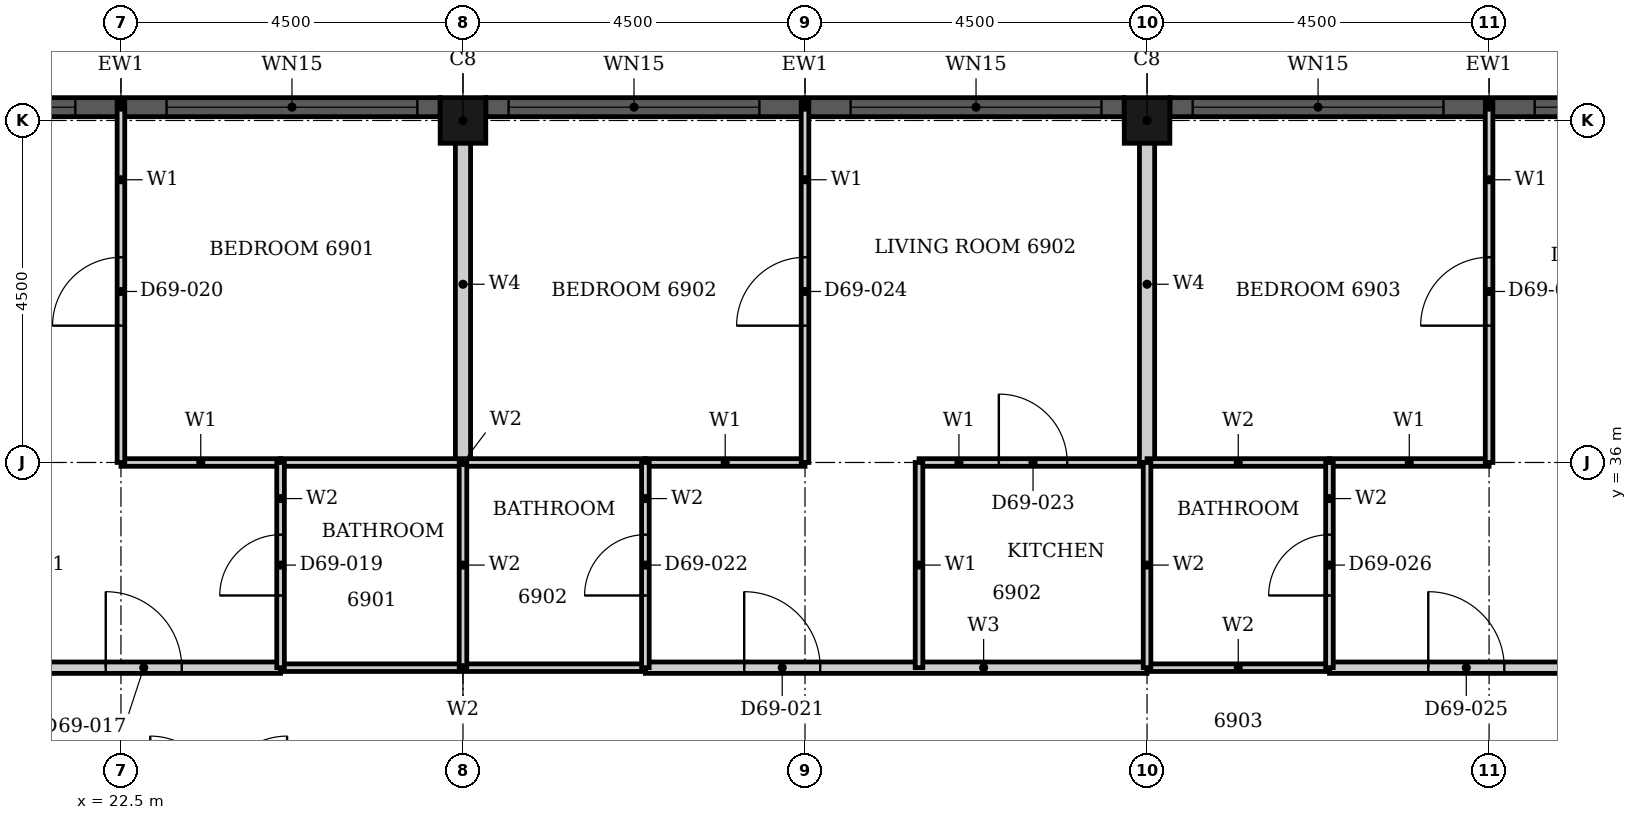
"""IFC4 building model, lengths in metres.
Left out: names, types, materials, properties, quantities, classifications, styles, units other than length and angle.
Written with IfcOpenShell. Run it as: python <this file> out.ifc"""

import sys

from ifc_helpers import new_model, si_unit, direction, frame, frame_2d, origin, origin_2d, place, context, subcontext, project, spatial, rectangle, hollow_rectangle, extrude, element, fill, save


model = new_model("IFC4")
c1 = context("Model", 3, precision=1e-05, world=origin(), true_north=direction((0.0, 1.0)))
c2 = subcontext(c1, "Body", "Model", "MODEL_VIEW")
j1 = project(units=[si_unit("LENGTHUNIT", "METRE"), si_unit("PLANEANGLEUNIT", "RADIAN")], contexts=[c1])
p1 = place(None, origin())
s1 = spatial("IfcSite", under=j1, at=p1, CompositionType="ELEMENT")
p2 = place(p1, origin())
s2 = spatial("IfcBuilding", under=s1, at=p2, CompositionType="ELEMENT")
p3 = place(p2, frame((0.0, 0.0, 271.2)))
s3 = spatial("IfcBuildingStorey", under=s2, at=p3, CompositionType="ELEMENT", Elevation=271.2)
for number, where, z_axis, x_axis in (
    (1, (36.0, 40.5, 0.0), (0.0, 0.0, 1.0), (1.0, 0.0, 0.0)),
    (2, (27.0, 40.5, 0.0), (0.0, 0.0, 1.0), (1.0, 0.0, 0.0)),
):
    element("IfcColumn", number, at=place(p3, frame(where, z_axis=z_axis, x_axis=x_axis)), inside=s3, PredefinedType="COLUMN", context=c2, shape_type="SweptSolid", body=[
        extrude(hollow_rectangle(XDim=0.6, YDim=0.6, WallThickness=0.02, at=origin_2d()), origin(), (0.0, 0.0, 1.0), 3.7),
    ])
p4 = place(p3, frame((44.7, 40.675, 0.0), z_axis=(0.0, 0.0, 1.0), x_axis=(-1.0, 0.0, 0.0)))
e3 = element("IfcWall", 3, at=p4, inside=s3, PredefinedType="SOLIDWALL", context=c2, shape_type="SweptSolid", body=[
    extrude(rectangle(XDim=8.4, YDim=0.25, at=frame_2d((4.2, 0.0))), origin(), (0.0, 0.0, 1.0), 3.7),
])
p5 = place(p4, frame((0.3, 0.0, 0.45)))
e4 = element("IfcOpeningElement", 4, at=p5, cuts=e3, PredefinedType="OPENING", context=c2, shape_type="SweptSolid", body=[
    extrude(rectangle(XDim=3.3, YDim=2.3, at=frame_2d((1.65, 1.15))), frame((0.0, 0.135, 0.0), z_axis=(0.0, -1.0, 0.0), x_axis=(1.0, 0.0, 0.0)), (0.0, 0.0, 1.0), 0.27),
])
p6 = place(p4, frame((4.8, 0.0, 0.45)))
e5 = element("IfcOpeningElement", 5, at=p6, cuts=e3, PredefinedType="OPENING", context=c2, shape_type="SweptSolid", body=[
    extrude(rectangle(XDim=3.3, YDim=2.3, at=frame_2d((1.65, 1.15))), frame((0.0, 0.135, 0.0), z_axis=(0.0, -1.0, 0.0), x_axis=(1.0, 0.0, 0.0)), (0.0, 0.0, 1.0), 0.27),
])
p7 = place(p3, frame((35.7, 40.675, 0.0), z_axis=(0.0, 0.0, 1.0), x_axis=(-1.0, 0.0, 0.0)))
e6 = element("IfcWall", 6, at=p7, inside=s3, PredefinedType="SOLIDWALL", context=c2, shape_type="SweptSolid", body=[
    extrude(rectangle(XDim=8.4, YDim=0.25, at=frame_2d((4.2, 0.0))), origin(), (0.0, 0.0, 1.0), 3.7),
])
p8 = place(p7, frame((0.3, 0.0, 0.45)))
e7 = element("IfcOpeningElement", 7, at=p8, cuts=e6, PredefinedType="OPENING", context=c2, shape_type="SweptSolid", body=[
    extrude(rectangle(XDim=3.3, YDim=2.3, at=frame_2d((1.65, 1.15))), frame((0.0, 0.135, 0.0), z_axis=(0.0, -1.0, 0.0), x_axis=(1.0, 0.0, 0.0)), (0.0, 0.0, 1.0), 0.27),
])
p9 = place(p7, frame((4.8, 0.0, 0.45)))
e8 = element("IfcOpeningElement", 8, at=p9, cuts=e6, PredefinedType="OPENING", context=c2, shape_type="SweptSolid", body=[
    extrude(rectangle(XDim=3.3, YDim=2.3, at=frame_2d((1.65, 1.15))), frame((0.0, 0.135, 0.0), z_axis=(0.0, -1.0, 0.0), x_axis=(1.0, 0.0, 0.0)), (0.0, 0.0, 1.0), 0.27),
])
p10 = place(p3, frame((26.7, 40.675, 0.0), z_axis=(0.0, 0.0, 1.0), x_axis=(-1.0, 0.0, 0.0)))
e9 = element("IfcWall", 9, at=p10, inside=s3, PredefinedType="SOLIDWALL", context=c2, shape_type="SweptSolid", body=[
    extrude(rectangle(XDim=8.4, YDim=0.25, at=frame_2d((4.2, 0.0))), origin(), (0.0, 0.0, 1.0), 3.7),
])
p11 = place(p10, frame((0.3, 0.0, 0.45)))
e10 = element("IfcOpeningElement", 10, at=p11, cuts=e9, PredefinedType="OPENING", context=c2, shape_type="SweptSolid", body=[
    extrude(rectangle(XDim=3.3, YDim=2.3, at=frame_2d((1.65, 1.15))), frame((0.0, 0.135, 0.0), z_axis=(0.0, -1.0, 0.0), x_axis=(1.0, 0.0, 0.0)), (0.0, 0.0, 1.0), 0.27),
])
p12 = place(p10, frame((4.8, 0.0, 0.45)))
e11 = element("IfcOpeningElement", 11, at=p12, cuts=e9, PredefinedType="OPENING", context=c2, shape_type="SweptSolid", body=[
    extrude(rectangle(XDim=3.3, YDim=2.3, at=frame_2d((1.65, 1.15))), frame((0.0, 0.135, 0.0), z_axis=(0.0, -1.0, 0.0), x_axis=(1.0, 0.0, 0.0)), (0.0, 0.0, 1.0), 0.27),
])
p13 = place(p3, frame((18.0, 33.3, 0.0), z_axis=(0.0, 0.0, 1.0), x_axis=(1.0, 0.0, 0.0)))
e12 = element("IfcWall", 12, at=p13, inside=s3, PredefinedType="PARTITIONING", context=c2, shape_type="SweptSolid", body=[
    extrude(rectangle(XDim=6.6, YDim=0.15, at=frame_2d((3.3, 0.0))), origin(), (0.0, 0.0, 1.0), 3.4),
])
p14 = place(p13, frame((4.3, 0.0, 0.0)))
e13 = element("IfcOpeningElement", 13, at=p14, cuts=e12, PredefinedType="OPENING", context=c2, shape_type="SweptSolid", body=[
    extrude(rectangle(XDim=1.0, YDim=2.2, at=frame_2d((0.5, 1.1))), frame((0.0, 0.085, 0.0), z_axis=(0.0, -1.0, 0.0), x_axis=(1.0, 0.0, 0.0)), (0.0, 0.0, 1.0), 0.17),
])
p15 = place(p3, frame((29.4, 33.3, 0.0), z_axis=(0.0, 0.0, 1.0), x_axis=(1.0, 0.0, 0.0)))
e14 = element("IfcWall", 14, at=p15, inside=s3, PredefinedType="PARTITIONING", context=c2, shape_type="SweptSolid", body=[
    extrude(rectangle(XDim=6.6, YDim=0.15, at=frame_2d((3.3, 0.0))), origin(), (0.0, 0.0, 1.0), 3.4),
])
p16 = place(p15, frame((1.3, 0.0, 0.0)))
e15 = element("IfcOpeningElement", 15, at=p16, cuts=e14, PredefinedType="OPENING", context=c2, shape_type="SweptSolid", body=[
    extrude(rectangle(XDim=1.0, YDim=2.2, at=frame_2d((0.5, 1.1))), frame((0.0, 0.085, 0.0), z_axis=(0.0, -1.0, 0.0), x_axis=(1.0, 0.0, 0.0)), (0.0, 0.0, 1.0), 0.17),
])
p17 = place(p3, frame((38.4, 33.3, 0.0), z_axis=(0.0, 0.0, 1.0), x_axis=(1.0, 0.0, 0.0)))
e16 = element("IfcWall", 16, at=p17, inside=s3, PredefinedType="PARTITIONING", context=c2, shape_type="SweptSolid", body=[
    extrude(rectangle(XDim=6.6, YDim=0.15, at=frame_2d((3.3, 0.0))), origin(), (0.0, 0.0, 1.0), 3.4),
])
p18 = place(p17, frame((1.3, 0.0, 0.0)))
e17 = element("IfcOpeningElement", 17, at=p18, cuts=e16, PredefinedType="OPENING", context=c2, shape_type="SweptSolid", body=[
    extrude(rectangle(XDim=1.0, YDim=2.2, at=frame_2d((0.5, 1.1))), frame((0.0, 0.085, 0.0), z_axis=(0.0, -1.0, 0.0), x_axis=(1.0, 0.0, 0.0)), (0.0, 0.0, 1.0), 0.17),
])
for number, where, z_axis, x_axis in (
    (18, (22.5, 36.0, 0.0), (0.0, 0.0, 1.0), (1.0, 0.0, 0.0)),
    (19, (29.4, 36.0, 0.0), (0.0, 0.0, 1.0), (1.0, 0.0, 0.0)),
):
    element("IfcWall", number, at=place(p3, frame(where, z_axis=z_axis, x_axis=x_axis)), inside=s3, PredefinedType="PARTITIONING", context=c2, shape_type="SweptSolid", body=[
        extrude(rectangle(XDim=2.1, YDim=0.1, at=frame_2d((1.05, 0.0))), origin(), (0.0, 0.0, 1.0), 3.4),
    ])
p19 = place(p3, frame((33.0, 36.0, 0.0), z_axis=(0.0, 0.0, 1.0), x_axis=(1.0, 0.0, 0.0)))
e20 = element("IfcWall", 20, at=p19, inside=s3, PredefinedType="PARTITIONING", context=c2, shape_type="SweptSolid", body=[
    extrude(rectangle(XDim=3.0, YDim=0.1, at=frame_2d((1.5, 0.0))), origin(), (0.0, 0.0, 1.0), 3.4),
])
p20 = place(p19, frame((1.05, 0.0, 0.0)))
e21 = element("IfcOpeningElement", 21, at=p20, cuts=e20, PredefinedType="OPENING", context=c2, shape_type="SweptSolid", body=[
    extrude(rectangle(XDim=0.9, YDim=2.1, at=frame_2d((0.45, 1.05))), frame((0.0, 0.06, 0.0), z_axis=(0.0, -1.0, 0.0), x_axis=(1.0, 0.0, 0.0)), (0.0, 0.0, 1.0), 0.12),
])
p21 = place(p3, frame((38.4, 36.0, 0.0), z_axis=(0.0, 0.0, 1.0), x_axis=(1.0, 0.0, 0.0)))
e22 = element("IfcWall", 22, at=p21, inside=s3, PredefinedType="PARTITIONING", context=c2, shape_type="SweptSolid", body=[
    extrude(rectangle(XDim=2.1, YDim=0.1, at=frame_2d((1.05, 0.0))), origin(), (0.0, 0.0, 1.0), 3.4),
])
p22 = place(p3, frame((22.5, 36.0, 0.0), z_axis=(0.0, 0.0, 1.0), x_axis=(0.0, 1.0, 0.0)))
e23 = element("IfcWall", 23, at=p22, inside=s3, PredefinedType="PARTITIONING", context=c2, shape_type="SweptSolid", body=[
    extrude(rectangle(XDim=4.74, YDim=0.1, at=frame_2d((2.37, 0.0))), origin(), (0.0, 0.0, 1.0), 3.4),
])
p23 = place(p22, frame((1.8, 0.0, 0.0)))
e24 = element("IfcOpeningElement", 24, at=p23, cuts=e23, PredefinedType="OPENING", context=c2, shape_type="SweptSolid", body=[
    extrude(rectangle(XDim=0.9, YDim=2.1, at=frame_2d((0.45, 1.05))), frame((0.0, 0.06, 0.0), z_axis=(0.0, -1.0, 0.0), x_axis=(1.0, 0.0, 0.0)), (0.0, 0.0, 1.0), 0.12),
])
p24 = place(p3, frame((31.5, 36.0, 0.0), z_axis=(0.0, 0.0, 1.0), x_axis=(0.0, 1.0, 0.0)))
e25 = element("IfcWall", 25, at=p24, inside=s3, PredefinedType="PARTITIONING", context=c2, shape_type="SweptSolid", body=[
    extrude(rectangle(XDim=4.74, YDim=0.1, at=frame_2d((2.37, 0.0))), origin(), (0.0, 0.0, 1.0), 3.4),
])
p25 = place(p24, frame((1.8, 0.0, 0.0)))
e26 = element("IfcOpeningElement", 26, at=p25, cuts=e25, PredefinedType="OPENING", context=c2, shape_type="SweptSolid", body=[
    extrude(rectangle(XDim=0.9, YDim=2.1, at=frame_2d((0.45, 1.05))), frame((0.0, 0.06, 0.0), z_axis=(0.0, -1.0, 0.0), x_axis=(1.0, 0.0, 0.0)), (0.0, 0.0, 1.0), 0.12),
])
p26 = place(p3, frame((33.0, 33.3, 0.0), z_axis=(0.0, 0.0, 1.0), x_axis=(0.0, 1.0, 0.0)))
e27 = element("IfcWall", 27, at=p26, inside=s3, PredefinedType="PARTITIONING", context=c2, shape_type="SweptSolid", body=[
    extrude(rectangle(XDim=2.7, YDim=0.1, at=frame_2d((1.35, 0.0))), origin(), (0.0, 0.0, 1.0), 3.4),
])
p27 = place(p3, frame((40.5, 36.0, 0.0), z_axis=(0.0, 0.0, 1.0), x_axis=(0.0, 1.0, 0.0)))
e28 = element("IfcWall", 28, at=p27, inside=s3, PredefinedType="PARTITIONING", context=c2, shape_type="SweptSolid", body=[
    extrude(rectangle(XDim=4.74, YDim=0.1, at=frame_2d((2.37, 0.0))), origin(), (0.0, 0.0, 1.0), 3.4),
])
p28 = place(p27, frame((1.8, 0.0, 0.0)))
e29 = element("IfcOpeningElement", 29, at=p28, cuts=e28, PredefinedType="OPENING", context=c2, shape_type="SweptSolid", body=[
    extrude(rectangle(XDim=0.9, YDim=2.1, at=frame_2d((0.45, 1.05))), frame((0.0, 0.06, 0.0), z_axis=(0.0, -1.0, 0.0), x_axis=(1.0, 0.0, 0.0)), (0.0, 0.0, 1.0), 0.12),
])
for number, where, z_axis, x_axis in (
    (30, (27.0, 36.0, 0.0), (0.0, 0.0, 1.0), (0.0, 1.0, 0.0)),
    (31, (36.0, 36.0, 0.0), (0.0, 0.0, 1.0), (0.0, 1.0, 0.0)),
):
    element("IfcWall", number, at=place(p3, frame(where, z_axis=z_axis, x_axis=x_axis)), inside=s3, PredefinedType="PARTITIONING", context=c2, shape_type="SweptSolid", body=[
        extrude(rectangle(XDim=4.69, YDim=0.2, at=frame_2d((2.345, 0.0))), origin(), (0.0, 0.0, 1.0), 3.4),
    ])
p29 = place(p3, frame((24.6, 33.3, 0.0), z_axis=(0.0, 0.0, 1.0), x_axis=(1.0, 0.0, 0.0)))
e32 = element("IfcWall", 32, at=p29, inside=s3, PredefinedType="PARTITIONING", context=c2, shape_type="SweptSolid", body=[
    extrude(rectangle(XDim=4.8, YDim=0.1, at=frame_2d((2.4, 0.0))), origin(), (0.0, 0.0, 1.0), 3.4),
])
p30 = place(p3, frame((36.0, 33.3, 0.0), z_axis=(0.0, 0.0, 1.0), x_axis=(1.0, 0.0, 0.0)))
e33 = element("IfcWall", 33, at=p30, inside=s3, PredefinedType="PARTITIONING", context=c2, shape_type="SweptSolid", body=[
    extrude(rectangle(XDim=2.4, YDim=0.1, at=frame_2d((1.2, 0.0))), origin(), (0.0, 0.0, 1.0), 3.4),
])
p31 = place(p3, frame((24.6, 36.0, 0.0), z_axis=(0.0, 0.0, 1.0), x_axis=(1.0, 0.0, 0.0)))
e34 = element("IfcWall", 34, at=p31, inside=s3, PredefinedType="PARTITIONING", context=c2, shape_type="SweptSolid", body=[
    extrude(rectangle(XDim=4.8, YDim=0.1, at=frame_2d((2.4, 0.0))), origin(), (0.0, 0.0, 1.0), 3.4),
])
p32 = place(p3, frame((36.0, 36.0, 0.0), z_axis=(0.0, 0.0, 1.0), x_axis=(1.0, 0.0, 0.0)))
e35 = element("IfcWall", 35, at=p32, inside=s3, PredefinedType="PARTITIONING", context=c2, shape_type="SweptSolid", body=[
    extrude(rectangle(XDim=2.4, YDim=0.1, at=frame_2d((1.2, 0.0))), origin(), (0.0, 0.0, 1.0), 3.4),
])
p33 = place(p3, frame((24.6, 33.3, 0.0), z_axis=(0.0, 0.0, 1.0), x_axis=(0.0, 1.0, 0.0)))
e36 = element("IfcWall", 36, at=p33, inside=s3, PredefinedType="PARTITIONING", context=c2, shape_type="SweptSolid", body=[
    extrude(rectangle(XDim=2.7, YDim=0.1, at=frame_2d((1.35, 0.0))), origin(), (0.0, 0.0, 1.0), 3.4),
])
p34 = place(p33, frame((0.95, 0.0, 0.0)))
e37 = element("IfcOpeningElement", 37, at=p34, cuts=e36, PredefinedType="OPENING", context=c2, shape_type="SweptSolid", body=[
    extrude(rectangle(XDim=0.8, YDim=2.1, at=frame_2d((0.4, 1.05))), frame((0.0, 0.06, 0.0), z_axis=(0.0, -1.0, 0.0), x_axis=(1.0, 0.0, 0.0)), (0.0, 0.0, 1.0), 0.12),
])
p35 = place(p3, frame((27.0, 33.3, 0.0), z_axis=(0.0, 0.0, 1.0), x_axis=(0.0, 1.0, 0.0)))
e38 = element("IfcWall", 38, at=p35, inside=s3, PredefinedType="PARTITIONING", context=c2, shape_type="SweptSolid", body=[
    extrude(rectangle(XDim=2.7, YDim=0.1, at=frame_2d((1.35, 0.0))), origin(), (0.0, 0.0, 1.0), 3.4),
])
p36 = place(p3, frame((29.4, 33.3, 0.0), z_axis=(0.0, 0.0, 1.0), x_axis=(0.0, 1.0, 0.0)))
e39 = element("IfcWall", 39, at=p36, inside=s3, PredefinedType="PARTITIONING", context=c2, shape_type="SweptSolid", body=[
    extrude(rectangle(XDim=2.7, YDim=0.1, at=frame_2d((1.35, 0.0))), origin(), (0.0, 0.0, 1.0), 3.4),
])
p37 = place(p36, frame((0.95, 0.0, 0.0)))
e40 = element("IfcOpeningElement", 40, at=p37, cuts=e39, PredefinedType="OPENING", context=c2, shape_type="SweptSolid", body=[
    extrude(rectangle(XDim=0.8, YDim=2.1, at=frame_2d((0.4, 1.05))), frame((0.0, 0.06, 0.0), z_axis=(0.0, -1.0, 0.0), x_axis=(1.0, 0.0, 0.0)), (0.0, 0.0, 1.0), 0.12),
])
p38 = place(p3, frame((36.0, 33.3, 0.0), z_axis=(0.0, 0.0, 1.0), x_axis=(0.0, 1.0, 0.0)))
e41 = element("IfcWall", 41, at=p38, inside=s3, PredefinedType="PARTITIONING", context=c2, shape_type="SweptSolid", body=[
    extrude(rectangle(XDim=2.7, YDim=0.1, at=frame_2d((1.35, 0.0))), origin(), (0.0, 0.0, 1.0), 3.4),
])
p39 = place(p3, frame((38.4, 33.3, 0.0), z_axis=(0.0, 0.0, 1.0), x_axis=(0.0, 1.0, 0.0)))
e42 = element("IfcWall", 42, at=p39, inside=s3, PredefinedType="PARTITIONING", context=c2, shape_type="SweptSolid", body=[
    extrude(rectangle(XDim=2.7, YDim=0.1, at=frame_2d((1.35, 0.0))), origin(), (0.0, 0.0, 1.0), 3.4),
])
p40 = place(p39, frame((0.95, 0.0, 0.0)))
e43 = element("IfcOpeningElement", 43, at=p40, cuts=e42, PredefinedType="OPENING", context=c2, shape_type="SweptSolid", body=[
    extrude(rectangle(XDim=0.8, YDim=2.1, at=frame_2d((0.4, 1.05))), frame((0.0, 0.06, 0.0), z_axis=(0.0, -1.0, 0.0), x_axis=(1.0, 0.0, 0.0)), (0.0, 0.0, 1.0), 0.12),
])
p41 = place(p5, origin())
e44 = element("IfcWindow", 44, at=p41, inside=s3, PartitioningType="SINGLE_PANEL", PredefinedType="WINDOW", context=c2, shape_type="SweptSolid", body=[
    extrude(rectangle(XDim=3.3, YDim=2.3, at=frame_2d((1.65, 1.15))), frame((0.0, 0.03, 0.0), z_axis=(0.0, -1.0, 0.0), x_axis=(1.0, 0.0, 0.0)), (0.0, 0.0, 1.0), 0.06),
])
fill(e4, e44)
p42 = place(p6, origin())
e45 = element("IfcWindow", 45, at=p42, inside=s3, PartitioningType="SINGLE_PANEL", PredefinedType="WINDOW", context=c2, shape_type="SweptSolid", body=[
    extrude(rectangle(XDim=3.3, YDim=2.3, at=frame_2d((1.65, 1.15))), frame((0.0, 0.03, 0.0), z_axis=(0.0, -1.0, 0.0), x_axis=(1.0, 0.0, 0.0)), (0.0, 0.0, 1.0), 0.06),
])
fill(e5, e45)
p43 = place(p8, origin())
e46 = element("IfcWindow", 46, at=p43, inside=s3, PartitioningType="SINGLE_PANEL", PredefinedType="WINDOW", context=c2, shape_type="SweptSolid", body=[
    extrude(rectangle(XDim=3.3, YDim=2.3, at=frame_2d((1.65, 1.15))), frame((0.0, 0.03, 0.0), z_axis=(0.0, -1.0, 0.0), x_axis=(1.0, 0.0, 0.0)), (0.0, 0.0, 1.0), 0.06),
])
fill(e7, e46)
p44 = place(p9, origin())
e47 = element("IfcWindow", 47, at=p44, inside=s3, PartitioningType="SINGLE_PANEL", PredefinedType="WINDOW", context=c2, shape_type="SweptSolid", body=[
    extrude(rectangle(XDim=3.3, YDim=2.3, at=frame_2d((1.65, 1.15))), frame((0.0, 0.03, 0.0), z_axis=(0.0, -1.0, 0.0), x_axis=(1.0, 0.0, 0.0)), (0.0, 0.0, 1.0), 0.06),
])
fill(e8, e47)
p45 = place(p11, origin())
e48 = element("IfcWindow", 48, at=p45, inside=s3, PartitioningType="SINGLE_PANEL", PredefinedType="WINDOW", context=c2, shape_type="SweptSolid", body=[
    extrude(rectangle(XDim=3.3, YDim=2.3, at=frame_2d((1.65, 1.15))), frame((0.0, 0.03, 0.0), z_axis=(0.0, -1.0, 0.0), x_axis=(1.0, 0.0, 0.0)), (0.0, 0.0, 1.0), 0.06),
])
fill(e10, e48)
p46 = place(p12, origin())
e49 = element("IfcWindow", 49, at=p46, inside=s3, PartitioningType="SINGLE_PANEL", PredefinedType="WINDOW", context=c2, shape_type="SweptSolid", body=[
    extrude(rectangle(XDim=3.3, YDim=2.3, at=frame_2d((1.65, 1.15))), frame((0.0, 0.03, 0.0), z_axis=(0.0, -1.0, 0.0), x_axis=(1.0, 0.0, 0.0)), (0.0, 0.0, 1.0), 0.06),
])
fill(e11, e49)
p47 = place(p14, origin())
e50 = element("IfcDoor", 50, at=p47, inside=s3, OperationType="SINGLE_SWING_LEFT", PredefinedType="DOOR", context=c2, shape_type="SweptSolid", body=[
    extrude(rectangle(XDim=1.0, YDim=2.2, at=frame_2d((0.5, 1.1))), frame((0.0, 0.025, 0.0), z_axis=(0.0, -1.0, 0.0), x_axis=(1.0, 0.0, 0.0)), (0.0, 0.0, 1.0), 0.05),
])
fill(e13, e50)
p48 = place(p34, origin())
e51 = element("IfcDoor", 51, at=p48, inside=s3, OperationType="SINGLE_SWING_LEFT", PredefinedType="DOOR", context=c2, shape_type="SweptSolid", body=[
    extrude(rectangle(XDim=0.8, YDim=2.1, at=frame_2d((0.4, 1.05))), frame((0.0, 0.025, 0.0), z_axis=(0.0, -1.0, 0.0), x_axis=(1.0, 0.0, 0.0)), (0.0, 0.0, 1.0), 0.05),
])
fill(e37, e51)
p49 = place(p23, origin())
e52 = element("IfcDoor", 52, at=p49, inside=s3, OperationType="SINGLE_SWING_RIGHT", PredefinedType="DOOR", context=c2, shape_type="SweptSolid", body=[
    extrude(rectangle(XDim=0.9, YDim=2.1, at=frame_2d((0.45, 1.05))), frame((0.0, 0.025, 0.0), z_axis=(0.0, -1.0, 0.0), x_axis=(1.0, 0.0, 0.0)), (0.0, 0.0, 1.0), 0.05),
])
fill(e24, e52)
p50 = place(p16, origin())
e53 = element("IfcDoor", 53, at=p50, inside=s3, OperationType="SINGLE_SWING_LEFT", PredefinedType="DOOR", context=c2, shape_type="SweptSolid", body=[
    extrude(rectangle(XDim=1.0, YDim=2.2, at=frame_2d((0.5, 1.1))), frame((0.0, 0.025, 0.0), z_axis=(0.0, -1.0, 0.0), x_axis=(1.0, 0.0, 0.0)), (0.0, 0.0, 1.0), 0.05),
])
fill(e15, e53)
p51 = place(p37, origin())
e54 = element("IfcDoor", 54, at=p51, inside=s3, OperationType="SINGLE_SWING_RIGHT", PredefinedType="DOOR", context=c2, shape_type="SweptSolid", body=[
    extrude(rectangle(XDim=0.8, YDim=2.1, at=frame_2d((0.4, 1.05))), frame((0.0, 0.025, 0.0), z_axis=(0.0, -1.0, 0.0), x_axis=(1.0, 0.0, 0.0)), (0.0, 0.0, 1.0), 0.05),
])
fill(e40, e54)
p52 = place(p20, origin())
e55 = element("IfcDoor", 55, at=p52, inside=s3, OperationType="SINGLE_SWING_LEFT", PredefinedType="DOOR", context=c2, shape_type="SweptSolid", body=[
    extrude(rectangle(XDim=0.9, YDim=2.1, at=frame_2d((0.45, 1.05))), frame((0.0, 0.025, 0.0), z_axis=(0.0, -1.0, 0.0), x_axis=(1.0, 0.0, 0.0)), (0.0, 0.0, 1.0), 0.05),
])
fill(e21, e55)
p53 = place(p25, origin())
e56 = element("IfcDoor", 56, at=p53, inside=s3, OperationType="SINGLE_SWING_LEFT", PredefinedType="DOOR", context=c2, shape_type="SweptSolid", body=[
    extrude(rectangle(XDim=0.9, YDim=2.1, at=frame_2d((0.45, 1.05))), frame((0.0, 0.025, 0.0), z_axis=(0.0, -1.0, 0.0), x_axis=(1.0, 0.0, 0.0)), (0.0, 0.0, 1.0), 0.05),
])
fill(e26, e56)
p54 = place(p18, origin())
e57 = element("IfcDoor", 57, at=p54, inside=s3, OperationType="SINGLE_SWING_LEFT", PredefinedType="DOOR", context=c2, shape_type="SweptSolid", body=[
    extrude(rectangle(XDim=1.0, YDim=2.2, at=frame_2d((0.5, 1.1))), frame((0.0, 0.025, 0.0), z_axis=(0.0, -1.0, 0.0), x_axis=(1.0, 0.0, 0.0)), (0.0, 0.0, 1.0), 0.05),
])
fill(e17, e57)
p55 = place(p40, origin())
e58 = element("IfcDoor", 58, at=p55, inside=s3, OperationType="SINGLE_SWING_RIGHT", PredefinedType="DOOR", context=c2, shape_type="SweptSolid", body=[
    extrude(rectangle(XDim=0.8, YDim=2.1, at=frame_2d((0.4, 1.05))), frame((0.0, 0.025, 0.0), z_axis=(0.0, -1.0, 0.0), x_axis=(1.0, 0.0, 0.0)), (0.0, 0.0, 1.0), 0.05),
])
fill(e43, e58)
p56 = place(p28, origin())
e59 = element("IfcDoor", 59, at=p56, inside=s3, OperationType="SINGLE_SWING_RIGHT", PredefinedType="DOOR", context=c2, shape_type="SweptSolid", body=[
    extrude(rectangle(XDim=0.9, YDim=2.1, at=frame_2d((0.45, 1.05))), frame((0.0, 0.025, 0.0), z_axis=(0.0, -1.0, 0.0), x_axis=(1.0, 0.0, 0.0)), (0.0, 0.0, 1.0), 0.05),
])
fill(e29, e59)
save(model, sys.argv[1])
